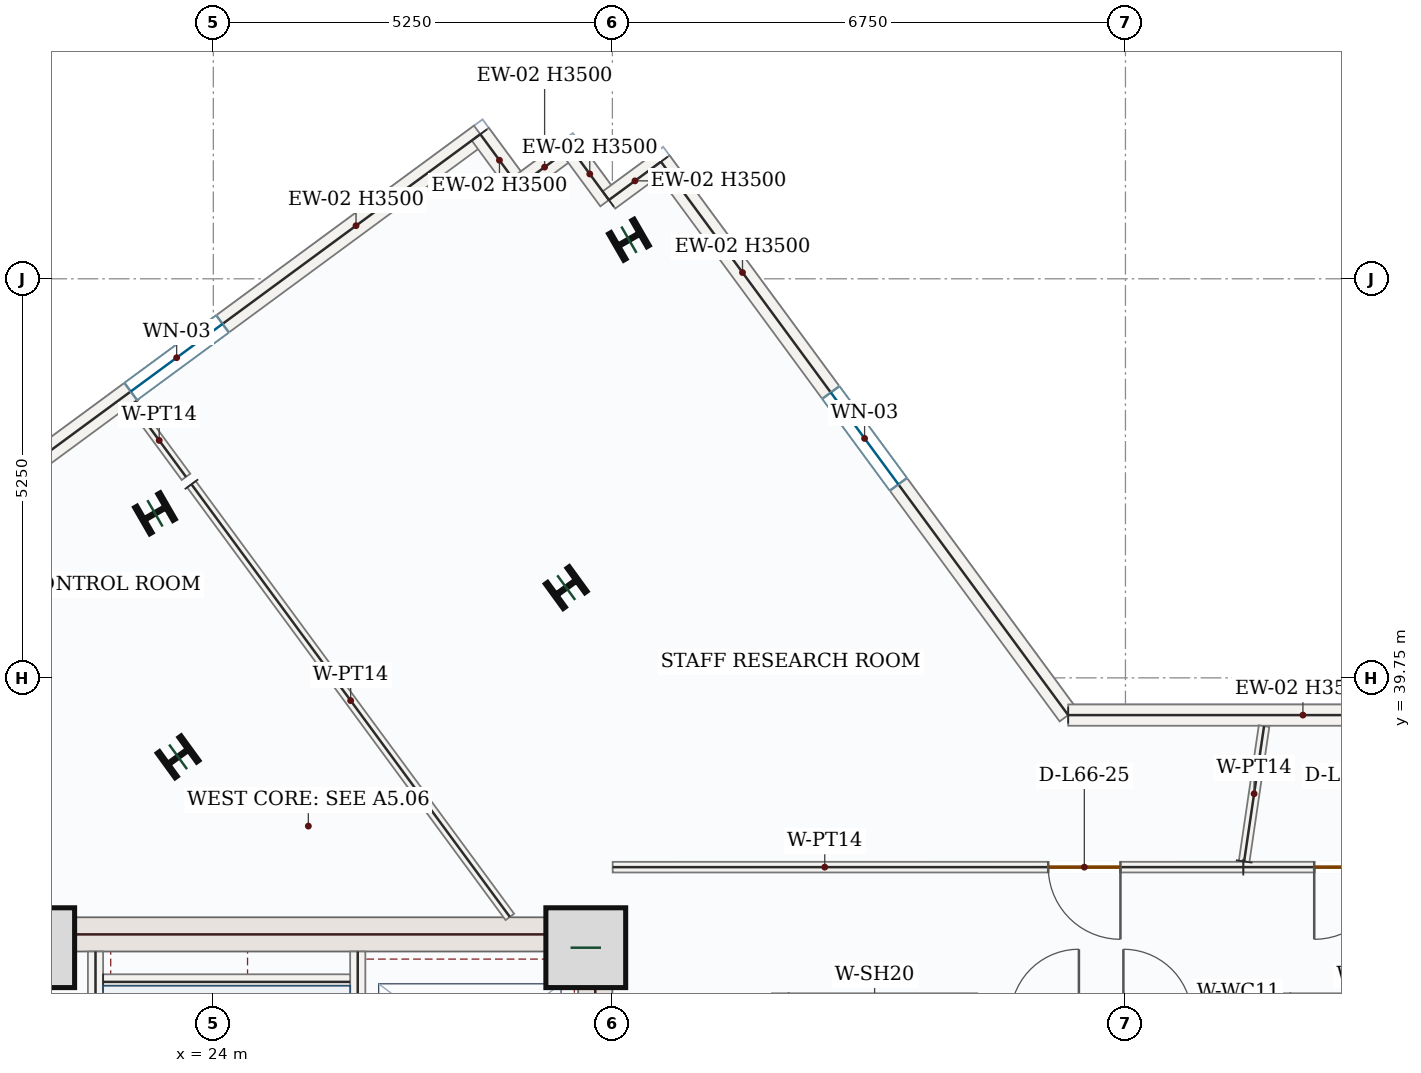
"""IFC4 building model, lengths in metres.
Left out: names, types, materials, properties, quantities, classifications, styles, units other than length and angle.
Written with IfcOpenShell. Run it as: python <this file> out.ifc"""

import sys

from ifc_helpers import new_model, si_unit, direction, frame, frame_2d, origin, origin_2d, place, context, subcontext, project, spatial, rectangle, i_section, extrude, source, transform, mapped, element, fill, save


model = new_model("IFC4")
c1 = context("Model", 3, precision=1e-05, world=origin(), true_north=direction((0.0, 1.0)))
c2 = subcontext(c1, "Body", "Model", "MODEL_VIEW")
j1 = project(units=[si_unit("LENGTHUNIT", "METRE"), si_unit("PLANEANGLEUNIT", "RADIAN")], contexts=[c1])
p1 = place(None, origin())
s1 = spatial("IfcSite", under=j1, at=p1, CompositionType="ELEMENT")
p2 = place(p1, origin())
s2 = spatial("IfcBuilding", under=s1, at=p2, CompositionType="ELEMENT")
p3 = place(p2, frame((0.0, 0.0, 276.6)))
s3 = spatial("IfcBuildingStorey", under=s2, at=p3, CompositionType="ELEMENT", Elevation=276.6)
p4 = place(p3, frame((29.025, 28.05, 0.0), z_axis=(0.0, 0.0, 1.0), x_axis=(0.0, 1.0, 0.0)))
e1 = element("IfcWall", 1, at=p4, inside=s3, PredefinedType="SHEAR", context=c2, shape_type="SweptSolid", body=[
    extrude(rectangle(XDim=8.55, YDim=0.45, at=frame_2d((4.275, 0.0))), origin(), (0.0, 0.0, 1.0), 3.5),
])
p5 = place(p4, frame((1.5, 0.0, 0.0)))
e2 = element("IfcOpeningElement", 2, at=p5, cuts=e1, PredefinedType="OPENING", context=c2, shape_type="SweptSolid", body=[
    extrude(rectangle(XDim=1.1, YDim=2.2, at=frame_2d((0.55, 1.1))), frame((0.0, 0.235, 0.0), z_axis=(0.0, -1.0, 0.0), x_axis=(1.0, 0.0, 0.0)), (0.0, 0.0, 1.0), 0.47),
])
m1 = source(origin(), c2, "Body", "SweptSolid", [
    extrude(rectangle(XDim=7.1, YDim=0.45, at=frame_2d((3.55, 0.0))), origin(), (0.0, 0.0, 1.0), 3.5),
])
p6 = place(p3, frame((21.7, 36.375, 0.0), z_axis=(0.0, 0.0, 1.0), x_axis=(1.0, 0.0, 0.0)))
e3 = element("IfcWall", 3, at=p6, inside=s3, PredefinedType="SHEAR", context=c2, shape_type="MappedRepresentation", body=[
    mapped(m1, transform((0.0, 0.0, 0.0), x_axis=(1.0, 0.0, 0.0), y_axis=(0.0, 1.0, 0.0), z_axis=(0.0, 0.0, 1.0), scale=1.0)),
])
m2 = source(origin(), c2, "Body", "SweptSolid", [
    extrude(rectangle(XDim=1.05, YDim=1.05, at=origin_2d()), origin(), (0.0, 0.0, 1.0), 3.75),
])
for number, where, z_axis, x_axis in (
    (4, (21.65, 36.2, 0.0), (0.0, 0.0, 1.0), (1.0, 0.0, 0.0)),
    (5, (28.9, 36.2, 0.0), (0.0, 0.0, 1.0), (1.0, 0.0, 0.0)),
):
    element("IfcColumn", number, at=place(p3, frame(where, z_axis=z_axis, x_axis=x_axis)), inside=s3, PredefinedType="COLUMN", context=c2, shape_type="MappedRepresentation", body=[
        mapped(m2, transform((0.0, 0.0, 0.0), x_axis=(1.0, 0.0, 0.0), y_axis=(0.0, 1.0, 0.0), z_axis=(0.0, 0.0, 1.0), scale=1.0)),
    ])
m3 = source(origin(), c2, "Body", "SweptSolid", [
    extrude(i_section(OverallWidth=0.399, OverallDepth=0.386, WebThickness=0.021, FlangeThickness=0.033, FilletRadius=0.018, at=origin_2d()), origin(), (0.0, 0.0, 1.0), 3.75),
])
for number, where, z_axis, x_axis in (
    (6, (28.643, 40.937, 0.0), (0.0, 0.0, 1.0), (-0.588, 0.809, 0.0)),
    (7, (23.536, 38.711, 0.0), (0.0, 0.0, 1.0), (-0.588, 0.809, 0.0)),
    (8, (29.468, 45.514, 0.0), (0.0, 0.0, 1.0), (-0.5, 0.866, 0.0)),
    (9, (23.232, 41.914, 0.0), (0.0, 0.0, 1.0), (-0.5, 0.866, 0.0)),
):
    element("IfcColumn", number, at=place(p3, frame(where, z_axis=z_axis, x_axis=x_axis)), inside=s3, PredefinedType="COLUMN", context=c2, shape_type="MappedRepresentation", body=[
        mapped(m3, transform((0.0, 0.0, 0.0), x_axis=(1.0, 0.0, 0.0), y_axis=(0.0, 1.0, 0.0), z_axis=(0.0, 0.0, 1.0), scale=1.0)),
    ])
p7 = place(p3, frame((19.522, 41.022, 0.0), z_axis=(0.0, 0.0, 1.0), x_axis=(0.805418797839, 0.592706132994, 0.0)))
e10 = element("IfcWall", 10, at=p7, inside=s3, PredefinedType="SOLIDWALL", context=c2, shape_type="SweptSolid", body=[
    extrude(rectangle(XDim=9.92, YDim=0.28, at=frame_2d((4.96, 0.0))), origin(), (0.0, 0.0, 1.0), 3.5),
])
p8 = place(p7, frame((4.21, 0.0, 0.85)))
e11 = element("IfcOpeningElement", 11, at=p8, cuts=e10, PredefinedType="OPENING", context=c2, shape_type="SweptSolid", body=[
    extrude(rectangle(XDim=1.5, YDim=1.5, at=frame_2d((0.75, 0.75))), frame((0.0, 0.15, 0.0), z_axis=(0.0, -1.0, 0.0), x_axis=(1.0, 0.0, 0.0)), (0.0, 0.0, 1.0), 0.3),
])
m4 = source(origin(), c2, "Body", "SweptSolid", [
    extrude(rectangle(XDim=0.85, YDim=0.28, at=frame_2d((0.425, 0.0))), origin(), (0.0, 0.0, 1.0), 3.5),
])
for number, where, z_axis, x_axis in (
    (12, (27.512, 46.902, 0.0), (0.0, 0.0, 1.0), (0.593, -0.805, 0.0)),
    (13, (28.016, 46.217, 0.0), (0.0, 0.0, 1.0), (0.805, 0.593, 0.0)),
):
    element("IfcWall", number, at=place(p3, frame(where, z_axis=z_axis, x_axis=x_axis)), inside=s3, PredefinedType="SOLIDWALL", context=c2, shape_type="MappedRepresentation", body=[
        mapped(m4, transform((0.0, 0.0, 0.0), x_axis=(1.0, 0.0, 0.0), y_axis=(0.0, 1.0, 0.0), z_axis=(0.0, 0.0, 1.0), scale=1.0)),
    ])
m5 = source(origin(), c2, "Body", "SweptSolid", [
    extrude(rectangle(XDim=0.85, YDim=0.28, at=frame_2d((0.425, 0.0))), origin(), (0.0, 0.0, 1.0), 3.5),
])
for number, where, z_axis, x_axis in (
    (14, (28.701, 46.721, 0.0), (0.0, 0.0, 1.0), (0.593, -0.805, 0.0)),
    (15, (29.204, 46.037, 0.0), (0.0, 0.0, 1.0), (0.805, 0.593, 0.0)),
):
    element("IfcWall", number, at=place(p3, frame(where, z_axis=z_axis, x_axis=x_axis)), inside=s3, PredefinedType="SOLIDWALL", context=c2, shape_type="MappedRepresentation", body=[
        mapped(m5, transform((0.0, 0.0, 0.0), x_axis=(1.0, 0.0, 0.0), y_axis=(0.0, 1.0, 0.0), z_axis=(0.0, 0.0, 1.0), scale=1.0)),
    ])
p9 = place(p3, frame((29.889, 46.54, 0.0), z_axis=(0.0, 0.0, 1.0), x_axis=(0.592715239748, -0.805412096117, 0.0)))
e16 = element("IfcWall", 16, at=p9, inside=s3, PredefinedType="SOLIDWALL", context=c2, shape_type="SweptSolid", body=[
    extrude(rectangle(XDim=9.039, YDim=0.28, at=frame_2d((4.52, 0.0))), origin(), (0.0, 0.0, 1.0), 3.5),
])
p10 = place(p9, frame((3.77, 0.0, 0.85)))
e17 = element("IfcOpeningElement", 17, at=p10, cuts=e16, PredefinedType="OPENING", context=c2, shape_type="SweptSolid", body=[
    extrude(rectangle(XDim=1.5, YDim=1.5, at=frame_2d((0.75, 0.75))), frame((0.0, 0.15, 0.0), z_axis=(0.0, -1.0, 0.0), x_axis=(1.0, 0.0, 0.0)), (0.0, 0.0, 1.0), 0.3),
])
m6 = source(origin(), c2, "Body", "SweptSolid", [
    extrude(rectangle(XDim=6.177, YDim=0.28, at=frame_2d((3.088, 0.0))), origin(), (0.0, 0.0, 1.0), 3.5),
])
p11 = place(p3, frame((35.247, 39.26, 0.0), z_axis=(0.0, 0.0, 1.0), x_axis=(1.0, 0.0, 0.0)))
e18 = element("IfcWall", 18, at=p11, inside=s3, PredefinedType="SOLIDWALL", context=c2, shape_type="MappedRepresentation", body=[
    mapped(m6, transform((0.0, 0.0, 0.0), x_axis=(1.0, 0.0, 0.0), y_axis=(0.0, 1.0, 0.0), z_axis=(0.0, 0.0, 1.0), scale=1.0)),
])
m7 = source(origin(), c2, "Body", "SweptSolid", [
    extrude(rectangle(XDim=7.87, YDim=0.2, at=frame_2d((3.935, 0.0))), origin(), (0.0, 0.0, 1.0), 3.5),
])
p12 = place(p3, frame((22.45, 28.28, 0.0), z_axis=(0.0, 0.0, 1.0), x_axis=(0.0, 1.0, 0.0)))
e19 = element("IfcWall", 19, at=p12, inside=s3, PredefinedType="SOLIDWALL", context=c2, shape_type="MappedRepresentation", body=[
    mapped(m7, transform((0.0, 0.0, 0.0), x_axis=(1.0, 0.0, 0.0), y_axis=(0.0, 1.0, 0.0), z_axis=(0.0, 0.0, 1.0), scale=1.0)),
])
p13 = place(p3, frame((25.9, 28.15, 0.0), z_axis=(0.0, 0.0, 1.0), x_axis=(0.0, 1.0, 0.0)))
e20 = element("IfcWall", 20, at=p13, inside=s3, PredefinedType="SOLIDWALL", context=c2, shape_type="SweptSolid", body=[
    extrude(rectangle(XDim=8.0, YDim=0.2, at=frame_2d((4.0, 0.0))), origin(), (0.0, 0.0, 1.0), 3.5),
])
p14 = place(p13, frame((0.4, 0.0, 0.0)))
e21 = element("IfcOpeningElement", 21, at=p14, cuts=e20, PredefinedType="OPENING", context=c2, shape_type="SweptSolid", body=[
    extrude(rectangle(XDim=1.05, YDim=2.15, at=frame_2d((0.525, 1.075))), frame((0.0, 0.11, 0.0), z_axis=(0.0, -1.0, 0.0), x_axis=(1.0, 0.0, 0.0)), (0.0, 0.0, 1.0), 0.22),
])
m8 = source(origin(), c2, "Body", "SweptSolid", [
    extrude(rectangle(XDim=3.25, YDim=0.2, at=frame_2d((1.625, 0.0))), origin(), (0.0, 0.0, 1.0), 3.5),
])
p15 = place(p3, frame((22.55, 35.75, 0.0), z_axis=(0.0, 0.0, 1.0), x_axis=(1.0, 0.0, 0.0)))
e22 = element("IfcWall", 22, at=p15, inside=s3, PredefinedType="SOLIDWALL", context=c2, shape_type="MappedRepresentation", body=[
    mapped(m8, transform((0.0, 0.0, 0.0), x_axis=(1.0, 0.0, 0.0), y_axis=(0.0, 1.0, 0.0), z_axis=(0.0, 0.0, 1.0), scale=1.0)),
])
p16 = place(p3, frame((31.45, 33.2, 0.0), z_axis=(0.0, 0.0, 1.0), x_axis=(0.0, 1.0, 0.0)))
e23 = element("IfcWall", 23, at=p16, inside=s3, PredefinedType="SOLIDWALL", context=c2, shape_type="SweptSolid", body=[
    extrude(rectangle(XDim=2.4, YDim=0.2, at=frame_2d((1.2, 0.0))), origin(), (0.0, 0.0, 1.0), 3.5),
])
p17 = place(p16, frame((0.65, 0.0, 0.0)))
e24 = element("IfcOpeningElement", 24, at=p17, cuts=e23, PredefinedType="OPENING", context=c2, shape_type="SweptSolid", body=[
    extrude(rectangle(XDim=1.1, YDim=2.15, at=frame_2d((0.55, 1.075))), frame((0.0, 0.11, 0.0), z_axis=(0.0, -1.0, 0.0), x_axis=(1.0, 0.0, 0.0)), (0.0, 0.0, 1.0), 0.22),
])
m9 = source(origin(), c2, "Body", "SweptSolid", [
    extrude(rectangle(XDim=2.4, YDim=0.2, at=frame_2d((1.2, 0.0))), origin(), (0.0, 0.0, 1.0), 3.5),
])
for number, where, z_axis, x_axis in (
    (25, (33.95, 33.2, 0.0), (0.0, 0.0, 1.0), (0.0, 1.0, 0.0)),
    (26, (38.05, 33.2, 0.0), (0.0, 0.0, 1.0), (0.0, 1.0, 0.0)),
):
    element("IfcWall", number, at=place(p3, frame(where, z_axis=z_axis, x_axis=x_axis)), inside=s3, PredefinedType="SOLIDWALL", context=c2, shape_type="MappedRepresentation", body=[
        mapped(m9, transform((0.0, 0.0, 0.0), x_axis=(1.0, 0.0, 0.0), y_axis=(0.0, 1.0, 0.0), z_axis=(0.0, 0.0, 1.0), scale=1.0)),
    ])
m10 = source(origin(), c2, "Body", "SweptSolid", [
    extrude(rectangle(XDim=1.191, YDim=0.14, at=frame_2d((0.595, 0.0))), origin(), (0.0, 0.0, 1.0), 3.5),
])
p18 = place(p3, frame((22.935, 43.353, 0.0), z_axis=(0.0, 0.0, 1.0), x_axis=(0.592625306686, -0.80547827151, 0.0)))
e27 = element("IfcWall", 27, at=p18, inside=s3, PredefinedType="PARTITIONING", context=c2, shape_type="MappedRepresentation", body=[
    mapped(m10, transform((0.0, 0.0, 0.0), x_axis=(1.0, 0.0, 0.0), y_axis=(0.0, 1.0, 0.0), z_axis=(0.0, 0.0, 1.0), scale=1.0)),
])
m11 = source(origin(), c2, "Body", "SweptSolid", [
    extrude(rectangle(XDim=7.067, YDim=0.14, at=frame_2d((3.533, 0.0))), origin(), (0.0, 0.0, 1.0), 3.5),
])
p19 = place(p3, frame((23.712, 42.297, 0.0), z_axis=(0.0, 0.0, 1.0), x_axis=(0.592689830588, -0.805430794493, 0.0)))
e28 = element("IfcWall", 28, at=p19, inside=s3, PredefinedType="PARTITIONING", context=c2, shape_type="MappedRepresentation", body=[
    mapped(m11, transform((0.0, 0.0, 0.0), x_axis=(1.0, 0.0, 0.0), y_axis=(0.0, 1.0, 0.0), z_axis=(0.0, 0.0, 1.0), scale=1.0)),
])
p20 = place(p3, frame((42.742, 37.26, 0.0), z_axis=(0.0, 0.0, 1.0), x_axis=(-0.999999998895, 4.7021207e-05, 0.0)))
e29 = element("IfcWall", 29, at=p20, inside=s3, PredefinedType="PARTITIONING", context=c2, shape_type="SweptSolid", body=[
    extrude(rectangle(XDim=5.192, YDim=0.14, at=frame_2d((2.596, 0.0))), origin(), (0.0, 0.0, 1.0), 3.5),
])
p21 = place(p20, frame((3.309, 0.0, 0.0)))
e30 = element("IfcOpeningElement", 30, at=p21, cuts=e29, PredefinedType="OPENING", context=c2, shape_type="SweptSolid", body=[
    extrude(rectangle(XDim=0.95, YDim=2.15, at=frame_2d((0.475, 1.075))), frame((0.0, 0.08, 0.0), z_axis=(0.0, -1.0, 0.0), x_axis=(1.0, 0.0, 0.0)), (0.0, 0.0, 1.0), 0.16),
])
m12 = source(origin(), c2, "Body", "SweptSolid", [
    extrude(rectangle(XDim=1.799, YDim=0.14, at=frame_2d((0.9, 0.0))), origin(), (0.0, 0.0, 1.0), 3.5),
])
p22 = place(p3, frame((37.561, 37.335, 0.0), z_axis=(0.0, 0.0, 1.0), x_axis=(0.14573227875, 0.989324063657, 0.0)))
e31 = element("IfcWall", 31, at=p22, inside=s3, PredefinedType="PARTITIONING", context=c2, shape_type="MappedRepresentation", body=[
    mapped(m12, transform((0.0, 0.0, 0.0), x_axis=(1.0, 0.0, 0.0), y_axis=(0.0, 1.0, 0.0), z_axis=(0.0, 0.0, 1.0), scale=1.0)),
])
p23 = place(p3, frame((37.55, 37.26, 0.0), z_axis=(0.0, 0.0, 1.0), x_axis=(-0.999999998268, -5.8852956e-05, 0.0)))
e32 = element("IfcWall", 32, at=p23, inside=s3, PredefinedType="PARTITIONING", context=c2, shape_type="SweptSolid", body=[
    extrude(rectangle(XDim=8.297, YDim=0.14, at=frame_2d((4.148, 0.0))), origin(), (0.0, 0.0, 1.0), 3.5),
])
p24 = place(p23, frame((1.616, 0.0, 0.0)))
e33 = element("IfcOpeningElement", 33, at=p24, cuts=e32, PredefinedType="OPENING", context=c2, shape_type="SweptSolid", body=[
    extrude(rectangle(XDim=0.95, YDim=2.15, at=frame_2d((0.475, 1.075))), frame((0.0, 0.08, 0.0), z_axis=(0.0, -1.0, 0.0), x_axis=(1.0, 0.0, 0.0)), (0.0, 0.0, 1.0), 0.16),
])
m13 = source(origin(), c2, "Body", "SweptSolid", [
    extrude(rectangle(XDim=1.5, YDim=1.5, at=frame_2d((0.75, 0.75))), frame((0.0, 0.03, 0.0), z_axis=(0.0, -1.0, 0.0), x_axis=(1.0, 0.0, 0.0)), (0.0, 0.0, 1.0), 0.06),
])
p25 = place(p8, origin())
e34 = element("IfcWindow", 34, at=p25, inside=s3, PartitioningType="SINGLE_PANEL", PredefinedType="WINDOW", context=c2, shape_type="MappedRepresentation", body=[
    mapped(m13, transform((0.0, 0.0, 0.0), x_axis=(1.0, 0.0, 0.0), y_axis=(0.0, 1.0, 0.0), z_axis=(0.0, 0.0, 1.0), scale=1.0)),
])
fill(e11, e34)
p26 = place(p10, origin())
e35 = element("IfcWindow", 35, at=p26, inside=s3, PartitioningType="SINGLE_PANEL", PredefinedType="WINDOW", context=c2, shape_type="MappedRepresentation", body=[
    mapped(m13, transform((0.0, 0.0, 0.0), x_axis=(1.0, 0.0, 0.0), y_axis=(0.0, 1.0, 0.0), z_axis=(0.0, 0.0, 1.0), scale=1.0)),
])
fill(e17, e35)
m14 = source(origin(), c2, "Body", "SweptSolid", [
    extrude(rectangle(XDim=0.95, YDim=2.15, at=frame_2d((0.475, 1.075))), frame((0.0, 0.025, 0.0), z_axis=(0.0, -1.0, 0.0), x_axis=(1.0, 0.0, 0.0)), (0.0, 0.0, 1.0), 0.05),
])
p27 = place(p21, origin())
e36 = element("IfcDoor", 36, at=p27, inside=s3, OperationType="SINGLE_SWING_RIGHT", PredefinedType="DOOR", context=c2, shape_type="MappedRepresentation", body=[
    mapped(m14, transform((0.0, 0.0, 0.0), x_axis=(1.0, 0.0, 0.0), y_axis=(0.0, 1.0, 0.0), z_axis=(0.0, 0.0, 1.0), scale=1.0)),
])
fill(e30, e36)
p28 = place(p24, origin())
e37 = element("IfcDoor", 37, at=p28, inside=s3, OperationType="SINGLE_SWING_LEFT", PredefinedType="DOOR", context=c2, shape_type="MappedRepresentation", body=[
    mapped(m14, transform((0.0, 0.0, 0.0), x_axis=(1.0, 0.0, 0.0), y_axis=(0.0, 1.0, 0.0), z_axis=(0.0, 0.0, 1.0), scale=1.0)),
])
fill(e33, e37)
save(model, sys.argv[1])
